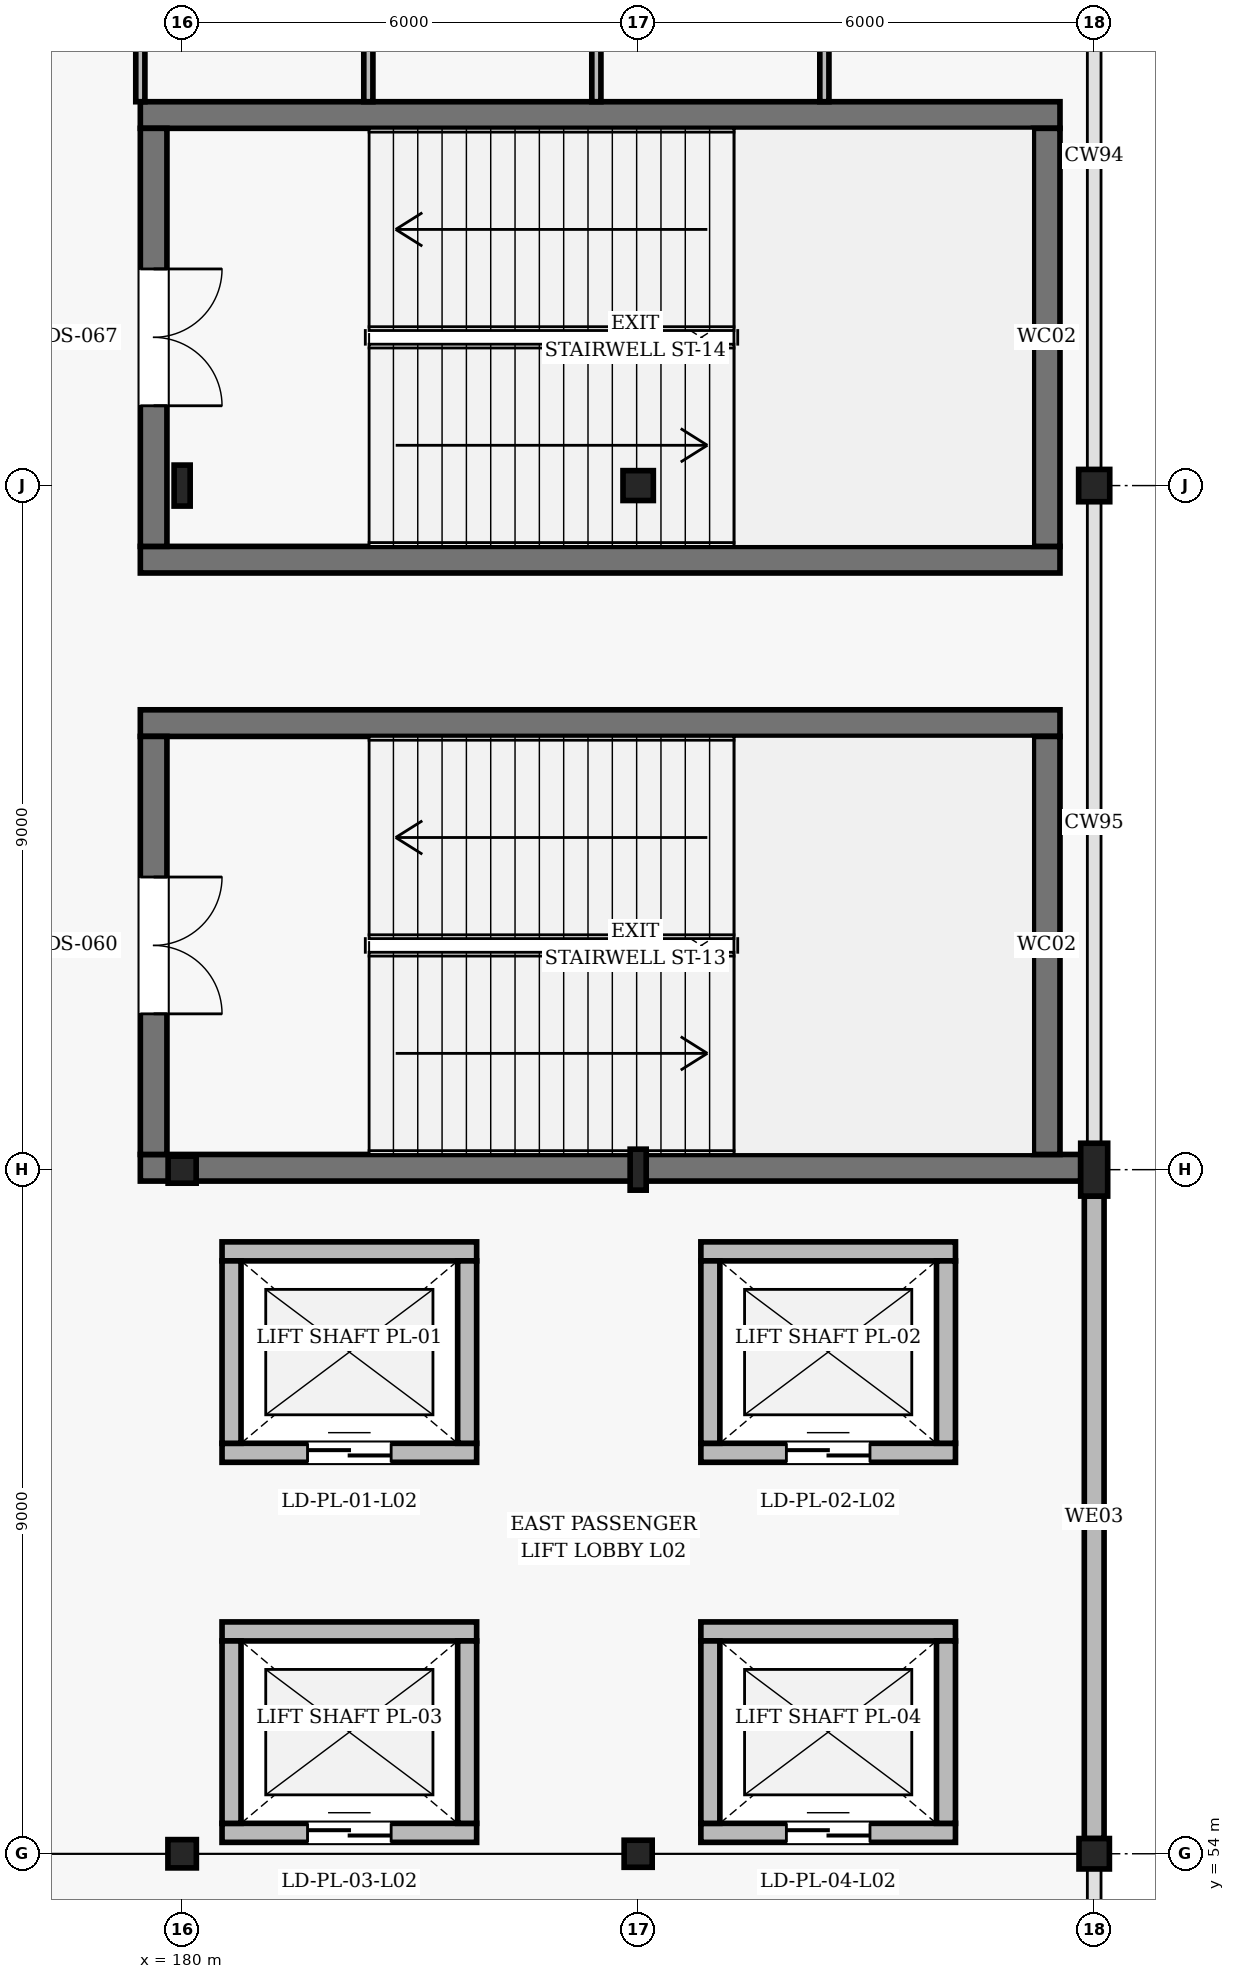
"""IFC4 building model, lengths in metres.
Left out: names, types, materials, properties, quantities, classifications, styles, units other than length and angle.
Written with IfcOpenShell. Run it as: python <this file> out.ifc"""

import sys

from ifc_helpers import new_model, si_unit, direction, frame, frame_2d, origin, origin_2d, place, context, subcontext, project, spatial, rectangle, hollow_rectangle, i_section, extrude, element, fill, save


model = new_model("IFC4")
c1 = context("Model", 3, precision=1e-05, world=origin(), true_north=direction((0.0, 1.0)))
c2 = subcontext(c1, "Body", "Model", "MODEL_VIEW")
j1 = project(units=[si_unit("LENGTHUNIT", "METRE"), si_unit("PLANEANGLEUNIT", "RADIAN")], contexts=[c1])
p1 = place(None, origin())
s1 = spatial("IfcSite", under=j1, at=p1, CompositionType="ELEMENT")
p2 = place(p1, origin())
s2 = spatial("IfcBuilding", under=s1, at=p2, CompositionType="ELEMENT")
p3 = place(p2, frame((0.0, 0.0, 10.8)))
s3 = spatial("IfcBuildingStorey", under=s2, at=p3, CompositionType="ELEMENT", Elevation=10.8)
p4 = place(p3, frame((180.0, 54.0, 0.0), z_axis=(0.0, 0.0, 1.0), x_axis=(1.0, 0.0, 0.0)))
e1 = element("IfcColumn", 1, at=p4, inside=s3, PredefinedType="COLUMN", context=c2, shape_type="SweptSolid", body=[
    extrude(i_section(OverallWidth=0.374, OverallDepth=0.372, WebThickness=0.016, FlangeThickness=0.026, FilletRadius=0.016, at=origin_2d()), origin(), (0.0, 0.0, 1.0), 4.8),
])
p5 = place(p3, frame((180.0, 63.0, 0.0), z_axis=(0.0, 0.0, 1.0), x_axis=(1.0, 0.0, 0.0)))
e2 = element("IfcColumn", 2, at=p5, inside=s3, PredefinedType="COLUMN", context=c2, shape_type="SweptSolid", body=[
    extrude(i_section(OverallWidth=0.369, OverallDepth=0.356, WebThickness=0.011, FlangeThickness=0.018, FilletRadius=0.015, at=origin_2d()), origin(), (0.0, 0.0, 1.0), 4.8),
])
p6 = place(p3, frame((180.0, 72.0, 0.0), z_axis=(0.0, 0.0, 1.0), x_axis=(1.0, 0.0, 0.0)))
e3 = element("IfcColumn", 3, at=p6, inside=s3, PredefinedType="COLUMN", context=c2, shape_type="SweptSolid", body=[
    extrude(i_section(OverallWidth=0.211, OverallDepth=0.539, WebThickness=0.012, FlangeThickness=0.019, FilletRadius=0.014, at=origin_2d()), origin(), (0.0, 0.0, 1.0), 4.8),
])
p7 = place(p3, frame((186.0, 54.0, 0.0), z_axis=(0.0, 0.0, 1.0), x_axis=(1.0, 0.0, 0.0)))
e4 = element("IfcColumn", 4, at=p7, inside=s3, PredefinedType="COLUMN", context=c2, shape_type="SweptSolid", body=[
    extrude(i_section(OverallWidth=0.369, OverallDepth=0.356, WebThickness=0.011, FlangeThickness=0.018, FilletRadius=0.015, at=origin_2d()), origin(), (0.0, 0.0, 1.0), 4.8),
])
p8 = place(p3, frame((186.0, 63.0, 0.0), z_axis=(0.0, 0.0, 1.0), x_axis=(1.0, 0.0, 0.0)))
e5 = element("IfcColumn", 5, at=p8, inside=s3, PredefinedType="COLUMN", context=c2, shape_type="SweptSolid", body=[
    extrude(i_section(OverallWidth=0.211, OverallDepth=0.539, WebThickness=0.012, FlangeThickness=0.019, FilletRadius=0.014, at=origin_2d()), origin(), (0.0, 0.0, 1.0), 4.8),
])
p9 = place(p3, frame((186.0, 72.0, 0.0), z_axis=(0.0, 0.0, 1.0), x_axis=(1.0, 0.0, 0.0)))
e6 = element("IfcColumn", 6, at=p9, inside=s3, PredefinedType="COLUMN", context=c2, shape_type="SweptSolid", body=[
    extrude(i_section(OverallWidth=0.399, OverallDepth=0.393, WebThickness=0.023, FlangeThickness=0.037, FilletRadius=0.018, at=origin_2d()), origin(), (0.0, 0.0, 1.0), 4.8),
])
p10 = place(p3, frame((192.0, 54.0, 0.0), z_axis=(0.0, 0.0, 1.0), x_axis=(1.0, 0.0, 0.0)))
e7 = element("IfcColumn", 7, at=p10, inside=s3, PredefinedType="COLUMN", context=c2, shape_type="SweptSolid", body=[
    extrude(hollow_rectangle(XDim=0.4, YDim=0.4, WallThickness=0.016, InnerFilletRadius=0.016, OuterFilletRadius=0.032, at=origin_2d()), origin(), (0.0, 0.0, 1.0), 4.8),
])
p11 = place(p3, frame((192.0, 63.0, 0.0), z_axis=(0.0, 0.0, 1.0), x_axis=(1.0, 0.0, 0.0)))
e8 = element("IfcColumn", 8, at=p11, inside=s3, PredefinedType="COLUMN", context=c2, shape_type="SweptSolid", body=[
    extrude(i_section(OverallWidth=0.355, OverallDepth=0.695, WebThickness=0.015, FlangeThickness=0.025, FilletRadius=0.018, at=origin_2d()), origin(), (0.0, 0.0, 1.0), 4.8),
])
p12 = place(p3, frame((192.0, 72.0, 0.0), z_axis=(0.0, 0.0, 1.0), x_axis=(1.0, 0.0, 0.0)))
e9 = element("IfcColumn", 9, at=p12, inside=s3, PredefinedType="COLUMN", context=c2, shape_type="SweptSolid", body=[
    extrude(i_section(OverallWidth=0.409, OverallDepth=0.425, WebThickness=0.031, FlangeThickness=0.049, FilletRadius=0.02, at=origin_2d()), origin(), (0.0, 0.0, 1.0), 4.8),
])
p13 = place(p3, frame((192.0, 62.653, 0.0), z_axis=(0.0, 0.0, 1.0), x_axis=(0.0, -1.0, 0.0)))
e10 = element("IfcWall", 10, at=p13, inside=s3, PredefinedType="SOLIDWALL", context=c2, shape_type="SweptSolid", body=[
    extrude(rectangle(XDim=8.453, YDim=0.26, at=frame_2d((4.226, 0.0))), origin(), (0.0, 0.0, 1.0), 4.285),
])
p14 = place(p3, frame((179.45, 63.025, 0.0), z_axis=(0.0, 0.0, 1.0), x_axis=(1.0, 0.0, 0.0)))
e11 = element("IfcWall", 11, at=p14, inside=s3, PredefinedType="SHEAR", context=c2, shape_type="SweptSolid", body=[
    extrude(rectangle(XDim=12.373, YDim=0.35, at=frame_2d((6.186, 0.0))), origin(), (0.0, 0.0, 1.0), 4.6),
])
p15 = place(p3, frame((191.55, 68.875, 0.0), z_axis=(0.0, 0.0, 1.0), x_axis=(-1.0, 0.0, 0.0)))
e12 = element("IfcWall", 12, at=p15, inside=s3, PredefinedType="SHEAR", context=c2, shape_type="SweptSolid", body=[
    extrude(rectangle(XDim=12.1, YDim=0.35, at=frame_2d((6.05, 0.0))), origin(), (0.0, 0.0, 1.0), 4.6),
])
p16 = place(p3, frame((179.625, 68.7, 0.0), z_axis=(0.0, 0.0, 1.0), x_axis=(0.0, -1.0, 0.0)))
e13 = element("IfcWall", 13, at=p16, inside=s3, PredefinedType="SHEAR", context=c2, shape_type="SweptSolid", body=[
    extrude(rectangle(XDim=5.5, YDim=0.35, at=frame_2d((2.75, 0.0))), origin(), (0.0, 0.0, 1.0), 4.6),
])
p17 = place(p16, frame((1.85, 0.0, 0.0)))
e14 = element("IfcOpeningElement", 14, at=p17, cuts=e13, PredefinedType="OPENING", context=c2, shape_type="SweptSolid", body=[
    extrude(rectangle(XDim=1.8, YDim=2.2, at=frame_2d((0.9, 1.1))), frame((0.0, 0.185, 0.0), z_axis=(0.0, -1.0, 0.0), x_axis=(1.0, 0.0, 0.0)), (0.0, 0.0, 1.0), 0.37),
])
p18 = place(p3, frame((191.375, 63.2, 0.0), z_axis=(0.0, 0.0, 1.0), x_axis=(0.0, 1.0, 0.0)))
e15 = element("IfcWall", 15, at=p18, inside=s3, PredefinedType="SHEAR", context=c2, shape_type="SweptSolid", body=[
    extrude(rectangle(XDim=5.5, YDim=0.35, at=frame_2d((2.75, 0.0))), origin(), (0.0, 0.0, 1.0), 4.6),
])
for number, where, z_axis, x_axis in (
    (16, (179.45, 71.025, 0.0), (0.0, 0.0, 1.0), (1.0, 0.0, 0.0)),
    (17, (191.55, 76.875, 0.0), (0.0, 0.0, 1.0), (-1.0, 0.0, 0.0)),
):
    element("IfcWall", number, at=place(p3, frame(where, z_axis=z_axis, x_axis=x_axis)), inside=s3, PredefinedType="SHEAR", context=c2, shape_type="SweptSolid", body=[
        extrude(rectangle(XDim=12.1, YDim=0.35, at=frame_2d((6.05, 0.0))), origin(), (0.0, 0.0, 1.0), 4.6),
    ])
p19 = place(p3, frame((179.625, 76.7, 0.0), z_axis=(0.0, 0.0, 1.0), x_axis=(0.0, -1.0, 0.0)))
e18 = element("IfcWall", 18, at=p19, inside=s3, PredefinedType="SHEAR", context=c2, shape_type="SweptSolid", body=[
    extrude(rectangle(XDim=5.5, YDim=0.35, at=frame_2d((2.75, 0.0))), origin(), (0.0, 0.0, 1.0), 4.6),
])
p20 = place(p19, frame((1.85, 0.0, 0.0)))
e19 = element("IfcOpeningElement", 19, at=p20, cuts=e18, PredefinedType="OPENING", context=c2, shape_type="SweptSolid", body=[
    extrude(rectangle(XDim=1.8, YDim=2.2, at=frame_2d((0.9, 1.1))), frame((0.0, 0.185, 0.0), z_axis=(0.0, -1.0, 0.0), x_axis=(1.0, 0.0, 0.0)), (0.0, 0.0, 1.0), 0.37),
])
p21 = place(p3, frame((191.375, 71.2, 0.0), z_axis=(0.0, 0.0, 1.0), x_axis=(0.0, 1.0, 0.0)))
e20 = element("IfcWall", 20, at=p21, inside=s3, PredefinedType="SHEAR", context=c2, shape_type="SweptSolid", body=[
    extrude(rectangle(XDim=5.5, YDim=0.35, at=frame_2d((2.75, 0.0))), origin(), (0.0, 0.0, 1.0), 4.6),
])
p22 = place(p3, frame((180.525, 59.275, 0.0), z_axis=(0.0, 0.0, 1.0), x_axis=(1.0, 0.0, 0.0)))
e21 = element("IfcWall", 21, at=p22, inside=s3, PredefinedType="SOLIDWALL", context=c2, shape_type="SweptSolid", body=[
    extrude(rectangle(XDim=3.35, YDim=0.25, at=frame_2d((1.675, 0.0))), origin(), (0.0, 0.0, 1.0), 4.6),
])
p23 = place(p22, frame((1.125, 0.0, 0.0)))
e22 = element("IfcOpeningElement", 22, at=p23, cuts=e21, PredefinedType="OPENING", context=c2, shape_type="SweptSolid", body=[
    extrude(rectangle(XDim=1.1, YDim=2.2, at=frame_2d((0.55, 1.1))), frame((0.0, 0.135, 0.0), z_axis=(0.0, -1.0, 0.0), x_axis=(1.0, 0.0, 0.0)), (0.0, 0.0, 1.0), 0.27),
])
p24 = place(p3, frame((183.875, 61.925, 0.0), z_axis=(0.0, 0.0, 1.0), x_axis=(-1.0, 0.0, 0.0)))
e23 = element("IfcWall", 23, at=p24, inside=s3, PredefinedType="SOLIDWALL", context=c2, shape_type="SweptSolid", body=[
    extrude(rectangle(XDim=3.35, YDim=0.25, at=frame_2d((1.675, 0.0))), origin(), (0.0, 0.0, 1.0), 4.6),
])
for number, where, z_axis, x_axis in (
    (24, (180.65, 61.8, 0.0), (0.0, 0.0, 1.0), (0.0, -1.0, 0.0)),
    (25, (183.75, 59.4, 0.0), (0.0, 0.0, 1.0), (0.0, 1.0, 0.0)),
):
    element("IfcWall", number, at=place(p3, frame(where, z_axis=z_axis, x_axis=x_axis)), inside=s3, PredefinedType="SOLIDWALL", context=c2, shape_type="SweptSolid", body=[
        extrude(rectangle(XDim=2.4, YDim=0.25, at=frame_2d((1.2, 0.0))), origin(), (0.0, 0.0, 1.0), 4.6),
    ])
p25 = place(p3, frame((186.825, 59.275, 0.0), z_axis=(0.0, 0.0, 1.0), x_axis=(1.0, 0.0, 0.0)))
e26 = element("IfcWall", 26, at=p25, inside=s3, PredefinedType="SOLIDWALL", context=c2, shape_type="SweptSolid", body=[
    extrude(rectangle(XDim=3.35, YDim=0.25, at=frame_2d((1.675, 0.0))), origin(), (0.0, 0.0, 1.0), 4.6),
])
p26 = place(p25, frame((1.125, 0.0, 0.0)))
e27 = element("IfcOpeningElement", 27, at=p26, cuts=e26, PredefinedType="OPENING", context=c2, shape_type="SweptSolid", body=[
    extrude(rectangle(XDim=1.1, YDim=2.2, at=frame_2d((0.55, 1.1))), frame((0.0, 0.135, 0.0), z_axis=(0.0, -1.0, 0.0), x_axis=(1.0, 0.0, 0.0)), (0.0, 0.0, 1.0), 0.27),
])
p27 = place(p3, frame((190.175, 61.925, 0.0), z_axis=(0.0, 0.0, 1.0), x_axis=(-1.0, 0.0, 0.0)))
e28 = element("IfcWall", 28, at=p27, inside=s3, PredefinedType="SOLIDWALL", context=c2, shape_type="SweptSolid", body=[
    extrude(rectangle(XDim=3.35, YDim=0.25, at=frame_2d((1.675, 0.0))), origin(), (0.0, 0.0, 1.0), 4.6),
])
for number, where, z_axis, x_axis in (
    (29, (186.95, 61.8, 0.0), (0.0, 0.0, 1.0), (0.0, -1.0, 0.0)),
    (30, (190.05, 59.4, 0.0), (0.0, 0.0, 1.0), (0.0, 1.0, 0.0)),
):
    element("IfcWall", number, at=place(p3, frame(where, z_axis=z_axis, x_axis=x_axis)), inside=s3, PredefinedType="SOLIDWALL", context=c2, shape_type="SweptSolid", body=[
        extrude(rectangle(XDim=2.4, YDim=0.25, at=frame_2d((1.2, 0.0))), origin(), (0.0, 0.0, 1.0), 4.6),
    ])
p28 = place(p3, frame((180.525, 54.275, 0.0), z_axis=(0.0, 0.0, 1.0), x_axis=(1.0, 0.0, 0.0)))
e31 = element("IfcWall", 31, at=p28, inside=s3, PredefinedType="SOLIDWALL", context=c2, shape_type="SweptSolid", body=[
    extrude(rectangle(XDim=3.35, YDim=0.25, at=frame_2d((1.675, 0.0))), origin(), (0.0, 0.0, 1.0), 3.974),
])
p29 = place(p28, frame((1.125, 0.0, 0.0)))
e32 = element("IfcOpeningElement", 32, at=p29, cuts=e31, PredefinedType="OPENING", context=c2, shape_type="SweptSolid", body=[
    extrude(rectangle(XDim=1.1, YDim=2.2, at=frame_2d((0.55, 1.1))), frame((0.0, 0.135, 0.0), z_axis=(0.0, -1.0, 0.0), x_axis=(1.0, 0.0, 0.0)), (0.0, 0.0, 1.0), 0.27),
])
p30 = place(p3, frame((183.875, 56.925, 0.0), z_axis=(0.0, 0.0, 1.0), x_axis=(-1.0, 0.0, 0.0)))
e33 = element("IfcWall", 33, at=p30, inside=s3, PredefinedType="SOLIDWALL", context=c2, shape_type="SweptSolid", body=[
    extrude(rectangle(XDim=3.35, YDim=0.25, at=frame_2d((1.675, 0.0))), origin(), (0.0, 0.0, 1.0), 4.128),
])
for number, where, z_axis, x_axis in (
    (34, (180.65, 56.8, 0.0), (0.0, 0.0, 1.0), (0.0, -1.0, 0.0)),
    (35, (183.75, 54.4, 0.0), (0.0, 0.0, 1.0), (0.0, 1.0, 0.0)),
):
    element("IfcWall", number, at=place(p3, frame(where, z_axis=z_axis, x_axis=x_axis)), inside=s3, PredefinedType="SOLIDWALL", context=c2, shape_type="SweptSolid", body=[
        extrude(rectangle(XDim=2.4, YDim=0.25, at=frame_2d((1.2, 0.0))), origin(), (0.0, 0.0, 1.0), 3.974),
    ])
p31 = place(p3, frame((186.825, 54.275, 0.0), z_axis=(0.0, 0.0, 1.0), x_axis=(1.0, 0.0, 0.0)))
e36 = element("IfcWall", 36, at=p31, inside=s3, PredefinedType="SOLIDWALL", context=c2, shape_type="SweptSolid", body=[
    extrude(rectangle(XDim=3.35, YDim=0.25, at=frame_2d((1.675, 0.0))), origin(), (0.0, 0.0, 1.0), 3.812),
])
p32 = place(p31, frame((1.125, 0.0, 0.0)))
e37 = element("IfcOpeningElement", 37, at=p32, cuts=e36, PredefinedType="OPENING", context=c2, shape_type="SweptSolid", body=[
    extrude(rectangle(XDim=1.1, YDim=2.2, at=frame_2d((0.55, 1.1))), frame((0.0, 0.135, 0.0), z_axis=(0.0, -1.0, 0.0), x_axis=(1.0, 0.0, 0.0)), (0.0, 0.0, 1.0), 0.27),
])
p33 = place(p3, frame((190.175, 56.925, 0.0), z_axis=(0.0, 0.0, 1.0), x_axis=(-1.0, 0.0, 0.0)))
e38 = element("IfcWall", 38, at=p33, inside=s3, PredefinedType="SOLIDWALL", context=c2, shape_type="SweptSolid", body=[
    extrude(rectangle(XDim=3.35, YDim=0.25, at=frame_2d((1.675, 0.0))), origin(), (0.0, 0.0, 1.0), 4.178),
])
for number, where, z_axis, x_axis in (
    (39, (186.95, 56.8, 0.0), (0.0, 0.0, 1.0), (0.0, -1.0, 0.0)),
    (40, (190.05, 54.4, 0.0), (0.0, 0.0, 1.0), (0.0, 1.0, 0.0)),
):
    element("IfcWall", number, at=place(p3, frame(where, z_axis=z_axis, x_axis=x_axis)), inside=s3, PredefinedType="SOLIDWALL", context=c2, shape_type="SweptSolid", body=[
        extrude(rectangle(XDim=2.4, YDim=0.25, at=frame_2d((1.2, 0.0))), origin(), (0.0, 0.0, 1.0), 3.812),
    ])
p34 = place(p3, frame((182.45, 79.45, 0.0), z_axis=(0.0, 0.0, 1.0), x_axis=(0.0, -1.0, 0.0)))
e41 = element("IfcWall", 41, at=p34, inside=s3, PredefinedType="PARTITIONING", context=c2, shape_type="SweptSolid", body=[
    extrude(rectangle(XDim=2.4, YDim=0.12, at=frame_2d((1.2, 0.0))), origin(), (0.0, 0.0, 1.0), 4.6),
])
p35 = place(p3, frame((179.45, 77.05, 0.0), z_axis=(0.0, 0.0, 1.0), x_axis=(0.0, 1.0, 0.0)))
e42 = element("IfcWall", 42, at=p35, inside=s3, PredefinedType="PARTITIONING", context=c2, shape_type="SweptSolid", body=[
    extrude(rectangle(XDim=2.4, YDim=0.12, at=frame_2d((1.2, 0.0))), origin(), (0.0, 0.0, 1.0), 4.178),
])
p36 = place(p35, frame((0.75, 0.0, 0.0)))
e43 = element("IfcOpeningElement", 43, at=p36, cuts=e42, PredefinedType="OPENING", context=c2, shape_type="SweptSolid", body=[
    extrude(rectangle(XDim=0.9, YDim=2.1, at=frame_2d((0.45, 1.05))), frame((0.0, 0.07, 0.0), z_axis=(0.0, -1.0, 0.0), x_axis=(1.0, 0.0, 0.0)), (0.0, 0.0, 1.0), 0.14),
])
for number, where, z_axis, x_axis in (
    (44, (185.45, 79.45, 0.0), (0.0, 0.0, 1.0), (0.0, -1.0, 0.0)),
    (45, (188.45, 79.45, 0.0), (0.0, 0.0, 1.0), (0.0, -1.0, 0.0)),
):
    element("IfcWall", number, at=place(p3, frame(where, z_axis=z_axis, x_axis=x_axis)), inside=s3, PredefinedType="PARTITIONING", context=c2, shape_type="SweptSolid", body=[
        extrude(rectangle(XDim=2.4, YDim=0.12, at=frame_2d((1.2, 0.0))), origin(), (0.0, 0.0, 1.0), 4.6),
    ])
p37 = place(p17, origin())
e46 = element("IfcDoor", 46, at=p37, inside=s3, OperationType="DOUBLE_DOOR_SINGLE_SWING", PredefinedType="DOOR", context=c2, shape_type="SweptSolid", body=[
    extrude(rectangle(XDim=1.8, YDim=2.2, at=frame_2d((0.9, 1.1))), frame((0.0, 0.025, 0.0), z_axis=(0.0, -1.0, 0.0), x_axis=(1.0, 0.0, 0.0)), (0.0, 0.0, 1.0), 0.05),
])
fill(e14, e46)
p38 = place(p20, origin())
e47 = element("IfcDoor", 47, at=p38, inside=s3, OperationType="DOUBLE_DOOR_SINGLE_SWING", PredefinedType="DOOR", context=c2, shape_type="SweptSolid", body=[
    extrude(rectangle(XDim=1.8, YDim=2.2, at=frame_2d((0.9, 1.1))), frame((0.0, 0.025, 0.0), z_axis=(0.0, -1.0, 0.0), x_axis=(1.0, 0.0, 0.0)), (0.0, 0.0, 1.0), 0.05),
])
fill(e19, e47)
p39 = place(p23, origin())
e48 = element("IfcDoor", 48, at=p39, inside=s3, OperationType="DOUBLE_DOOR_SLIDING", PredefinedType="DOOR", context=c2, shape_type="SweptSolid", body=[
    extrude(rectangle(XDim=1.1, YDim=2.2, at=frame_2d((0.55, 1.1))), frame((0.0, 0.025, 0.0), z_axis=(0.0, -1.0, 0.0), x_axis=(1.0, 0.0, 0.0)), (0.0, 0.0, 1.0), 0.05),
])
fill(e22, e48)
p40 = place(p26, origin())
e49 = element("IfcDoor", 49, at=p40, inside=s3, OperationType="DOUBLE_DOOR_SLIDING", PredefinedType="DOOR", context=c2, shape_type="SweptSolid", body=[
    extrude(rectangle(XDim=1.1, YDim=2.2, at=frame_2d((0.55, 1.1))), frame((0.0, 0.025, 0.0), z_axis=(0.0, -1.0, 0.0), x_axis=(1.0, 0.0, 0.0)), (0.0, 0.0, 1.0), 0.05),
])
fill(e27, e49)
p41 = place(p29, origin())
e50 = element("IfcDoor", 50, at=p41, inside=s3, OperationType="DOUBLE_DOOR_SLIDING", PredefinedType="DOOR", context=c2, shape_type="SweptSolid", body=[
    extrude(rectangle(XDim=1.1, YDim=2.2, at=frame_2d((0.55, 1.1))), frame((0.0, 0.025, 0.0), z_axis=(0.0, -1.0, 0.0), x_axis=(1.0, 0.0, 0.0)), (0.0, 0.0, 1.0), 0.05),
])
fill(e32, e50)
p42 = place(p32, origin())
e51 = element("IfcDoor", 51, at=p42, inside=s3, OperationType="DOUBLE_DOOR_SLIDING", PredefinedType="DOOR", context=c2, shape_type="SweptSolid", body=[
    extrude(rectangle(XDim=1.1, YDim=2.2, at=frame_2d((0.55, 1.1))), frame((0.0, 0.025, 0.0), z_axis=(0.0, -1.0, 0.0), x_axis=(1.0, 0.0, 0.0)), (0.0, 0.0, 1.0), 0.05),
])
fill(e37, e51)
save(model, sys.argv[1])
